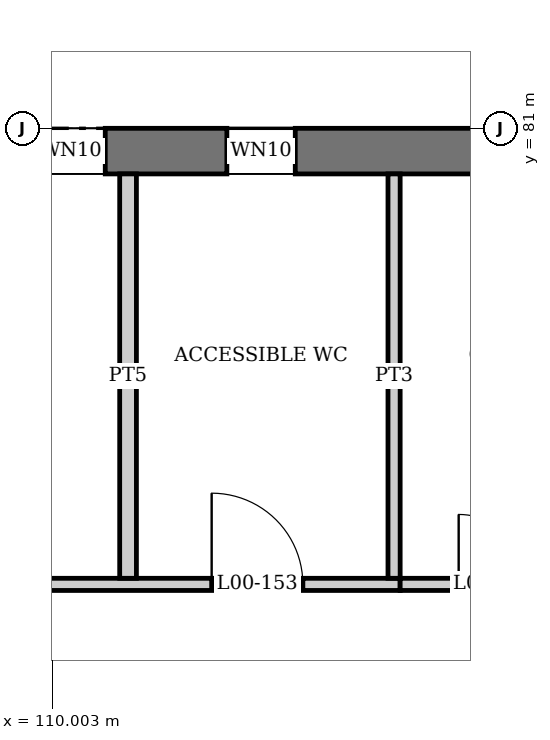
"""IFC4 building model, lengths in metres.
Left out: names, types, materials, properties, quantities, classifications, styles, units other than length and angle.
Written with IfcOpenShell. Run it as: python <this file> out.ifc"""

import sys

from ifc_helpers import new_model, si_unit, direction, frame, frame_2d, origin, place, context, subcontext, project, spatial, rectangle, extrude, element, fill, save


model = new_model("IFC4")
c1 = context("Model", 3, precision=1e-05, world=origin(), true_north=direction((0.0, 1.0)))
c2 = subcontext(c1, "Body", "Model", "MODEL_VIEW")
j1 = project(units=[si_unit("LENGTHUNIT", "METRE"), si_unit("PLANEANGLEUNIT", "RADIAN")], contexts=[c1])
p1 = place(None, origin())
s1 = spatial("IfcSite", under=j1, at=p1, CompositionType="ELEMENT")
p2 = place(p1, origin())
s2 = spatial("IfcBuilding", under=s1, at=p2, CompositionType="ELEMENT")
p3 = place(p2, origin())
s3 = spatial("IfcBuildingStorey", under=s2, at=p3, CompositionType="ELEMENT", Elevation=0.0)
p4 = place(p3, frame((0.0, 80.7, 0.0), z_axis=(0.0, 0.0, 1.0), x_axis=(1.0, 0.0, 0.0)))
e1 = element("IfcWall", 1, at=p4, inside=s3, PredefinedType="SHEAR", context=c2, shape_type="SweptSolid", body=[
    extrude(rectangle(XDim=180.0, YDim=0.6, at=frame_2d((90.0, 0.0))), origin(), (0.0, 0.0, 1.0), 6.0),
])
p5 = place(p4, frame((28.25, 0.0, 0.0)))
e2 = element("IfcOpeningElement", 2, at=p5, cuts=e1, PredefinedType="OPENING", context=c2, shape_type="SweptSolid", body=[
    extrude(rectangle(XDim=1.8, YDim=2.4, at=frame_2d((0.9, 1.2))), frame((0.0, 0.31, 0.0), z_axis=(0.0, -1.0, 0.0), x_axis=(1.0, 0.0, 0.0)), (0.0, 0.0, 1.0), 0.62),
])
p6 = place(p4, frame((82.25, 0.0, 0.0)))
e3 = element("IfcOpeningElement", 3, at=p6, cuts=e1, PredefinedType="OPENING", context=c2, shape_type="SweptSolid", body=[
    extrude(rectangle(XDim=1.8, YDim=2.4, at=frame_2d((0.9, 1.2))), frame((0.0, 0.31, 0.0), z_axis=(0.0, -1.0, 0.0), x_axis=(1.0, 0.0, 0.0)), (0.0, 0.0, 1.0), 0.62),
])
p7 = place(p4, frame((90.75, 0.0, 0.0)))
e4 = element("IfcOpeningElement", 4, at=p7, cuts=e1, PredefinedType="OPENING", context=c2, shape_type="SweptSolid", body=[
    extrude(rectangle(XDim=3.0, YDim=3.0, at=frame_2d((1.5, 1.5))), frame((0.0, 0.31, 0.0), z_axis=(0.0, -1.0, 0.0), x_axis=(1.0, 0.0, 0.0)), (0.0, 0.0, 1.0), 0.62),
])
p8 = place(p4, frame((95.25, 0.0, 0.0)))
e5 = element("IfcOpeningElement", 5, at=p8, cuts=e1, PredefinedType="OPENING", context=c2, shape_type="SweptSolid", body=[
    extrude(rectangle(XDim=3.0, YDim=3.0, at=frame_2d((1.5, 1.5))), frame((0.0, 0.31, 0.0), z_axis=(0.0, -1.0, 0.0), x_axis=(1.0, 0.0, 0.0)), (0.0, 0.0, 1.0), 0.62),
])
p9 = place(p4, frame((1.35, 0.0, 0.9)))
e6 = element("IfcOpeningElement", 6, at=p9, cuts=e1, PredefinedType="OPENING", context=c2, shape_type="SweptSolid", body=[
    extrude(rectangle(XDim=1.8, YDim=1.5, at=frame_2d((0.9, 0.75))), frame((0.0, 0.31, 0.0), z_axis=(0.0, -1.0, 0.0), x_axis=(1.0, 0.0, 0.0)), (0.0, 0.0, 1.0), 0.62),
])
p10 = place(p4, frame((5.85, 0.0, 0.9)))
e7 = element("IfcOpeningElement", 7, at=p10, cuts=e1, PredefinedType="OPENING", context=c2, shape_type="SweptSolid", body=[
    extrude(rectangle(XDim=1.8, YDim=1.5, at=frame_2d((0.9, 0.75))), frame((0.0, 0.31, 0.0), z_axis=(0.0, -1.0, 0.0), x_axis=(1.0, 0.0, 0.0)), (0.0, 0.0, 1.0), 0.62),
])
p11 = place(p4, frame((10.35, 0.0, 0.9)))
e8 = element("IfcOpeningElement", 8, at=p11, cuts=e1, PredefinedType="OPENING", context=c2, shape_type="SweptSolid", body=[
    extrude(rectangle(XDim=1.8, YDim=1.5, at=frame_2d((0.9, 0.75))), frame((0.0, 0.31, 0.0), z_axis=(0.0, -1.0, 0.0), x_axis=(1.0, 0.0, 0.0)), (0.0, 0.0, 1.0), 0.62),
])
p12 = place(p4, frame((14.85, 0.0, 0.9)))
e9 = element("IfcOpeningElement", 9, at=p12, cuts=e1, PredefinedType="OPENING", context=c2, shape_type="SweptSolid", body=[
    extrude(rectangle(XDim=1.8, YDim=1.5, at=frame_2d((0.9, 0.75))), frame((0.0, 0.31, 0.0), z_axis=(0.0, -1.0, 0.0), x_axis=(1.0, 0.0, 0.0)), (0.0, 0.0, 1.0), 0.62),
])
p13 = place(p4, frame((19.65, 0.0, 1.2)))
e10 = element("IfcOpeningElement", 10, at=p13, cuts=e1, PredefinedType="OPENING", context=c2, shape_type="SweptSolid", body=[
    extrude(rectangle(XDim=1.2, YDim=1.2, at=frame_2d((0.6, 0.6))), frame((0.0, 0.31, 0.0), z_axis=(0.0, -1.0, 0.0), x_axis=(1.0, 0.0, 0.0)), (0.0, 0.0, 1.0), 0.62),
])
p14 = place(p4, frame((24.15, 0.0, 1.2)))
e11 = element("IfcOpeningElement", 11, at=p14, cuts=e1, PredefinedType="OPENING", context=c2, shape_type="SweptSolid", body=[
    extrude(rectangle(XDim=1.2, YDim=1.2, at=frame_2d((0.6, 0.6))), frame((0.0, 0.31, 0.0), z_axis=(0.0, -1.0, 0.0), x_axis=(1.0, 0.0, 0.0)), (0.0, 0.0, 1.0), 0.62),
])
p15 = place(p4, frame((37.35, 0.0, 0.9)))
e12 = element("IfcOpeningElement", 12, at=p15, cuts=e1, PredefinedType="OPENING", context=c2, shape_type="SweptSolid", body=[
    extrude(rectangle(XDim=1.8, YDim=1.5, at=frame_2d((0.9, 0.75))), frame((0.0, 0.31, 0.0), z_axis=(0.0, -1.0, 0.0), x_axis=(1.0, 0.0, 0.0)), (0.0, 0.0, 1.0), 0.62),
])
p16 = place(p4, frame((41.85, 0.0, 0.9)))
e13 = element("IfcOpeningElement", 13, at=p16, cuts=e1, PredefinedType="OPENING", context=c2, shape_type="SweptSolid", body=[
    extrude(rectangle(XDim=1.8, YDim=1.5, at=frame_2d((0.9, 0.75))), frame((0.0, 0.31, 0.0), z_axis=(0.0, -1.0, 0.0), x_axis=(1.0, 0.0, 0.0)), (0.0, 0.0, 1.0), 0.62),
])
p17 = place(p4, frame((46.35, 0.0, 0.9)))
e14 = element("IfcOpeningElement", 14, at=p17, cuts=e1, PredefinedType="OPENING", context=c2, shape_type="SweptSolid", body=[
    extrude(rectangle(XDim=1.8, YDim=1.5, at=frame_2d((0.9, 0.75))), frame((0.0, 0.31, 0.0), z_axis=(0.0, -1.0, 0.0), x_axis=(1.0, 0.0, 0.0)), (0.0, 0.0, 1.0), 0.62),
])
p18 = place(p4, frame((50.85, 0.0, 0.9)))
e15 = element("IfcOpeningElement", 15, at=p18, cuts=e1, PredefinedType="OPENING", context=c2, shape_type="SweptSolid", body=[
    extrude(rectangle(XDim=1.8, YDim=1.5, at=frame_2d((0.9, 0.75))), frame((0.0, 0.31, 0.0), z_axis=(0.0, -1.0, 0.0), x_axis=(1.0, 0.0, 0.0)), (0.0, 0.0, 1.0), 0.62),
])
p19 = place(p4, frame((55.35, 0.0, 0.9)))
e16 = element("IfcOpeningElement", 16, at=p19, cuts=e1, PredefinedType="OPENING", context=c2, shape_type="SweptSolid", body=[
    extrude(rectangle(XDim=1.8, YDim=1.5, at=frame_2d((0.9, 0.75))), frame((0.0, 0.31, 0.0), z_axis=(0.0, -1.0, 0.0), x_axis=(1.0, 0.0, 0.0)), (0.0, 0.0, 1.0), 0.62),
])
p20 = place(p4, frame((59.85, 0.0, 0.9)))
e17 = element("IfcOpeningElement", 17, at=p20, cuts=e1, PredefinedType="OPENING", context=c2, shape_type="SweptSolid", body=[
    extrude(rectangle(XDim=1.8, YDim=1.5, at=frame_2d((0.9, 0.75))), frame((0.0, 0.31, 0.0), z_axis=(0.0, -1.0, 0.0), x_axis=(1.0, 0.0, 0.0)), (0.0, 0.0, 1.0), 0.62),
])
p21 = place(p4, frame((64.35, 0.0, 0.9)))
e18 = element("IfcOpeningElement", 18, at=p21, cuts=e1, PredefinedType="OPENING", context=c2, shape_type="SweptSolid", body=[
    extrude(rectangle(XDim=1.8, YDim=1.5, at=frame_2d((0.9, 0.75))), frame((0.0, 0.31, 0.0), z_axis=(0.0, -1.0, 0.0), x_axis=(1.0, 0.0, 0.0)), (0.0, 0.0, 1.0), 0.62),
])
p22 = place(p4, frame((68.85, 0.0, 0.9)))
e19 = element("IfcOpeningElement", 19, at=p22, cuts=e1, PredefinedType="OPENING", context=c2, shape_type="SweptSolid", body=[
    extrude(rectangle(XDim=1.8, YDim=1.5, at=frame_2d((0.9, 0.75))), frame((0.0, 0.31, 0.0), z_axis=(0.0, -1.0, 0.0), x_axis=(1.0, 0.0, 0.0)), (0.0, 0.0, 1.0), 0.62),
])
p23 = place(p4, frame((73.35, 0.0, 0.9)))
e20 = element("IfcOpeningElement", 20, at=p23, cuts=e1, PredefinedType="OPENING", context=c2, shape_type="SweptSolid", body=[
    extrude(rectangle(XDim=1.8, YDim=1.5, at=frame_2d((0.9, 0.75))), frame((0.0, 0.31, 0.0), z_axis=(0.0, -1.0, 0.0), x_axis=(1.0, 0.0, 0.0)), (0.0, 0.0, 1.0), 0.62),
])
p24 = place(p4, frame((77.85, 0.0, 0.9)))
e21 = element("IfcOpeningElement", 21, at=p24, cuts=e1, PredefinedType="OPENING", context=c2, shape_type="SweptSolid", body=[
    extrude(rectangle(XDim=1.8, YDim=1.5, at=frame_2d((0.9, 0.75))), frame((0.0, 0.31, 0.0), z_axis=(0.0, -1.0, 0.0), x_axis=(1.0, 0.0, 0.0)), (0.0, 0.0, 1.0), 0.62),
])
p25 = place(p4, frame((100.8, 0.0, 1.7)))
e22 = element("IfcOpeningElement", 22, at=p25, cuts=e1, PredefinedType="OPENING", context=c2, shape_type="SweptSolid", body=[
    extrude(rectangle(XDim=0.9, YDim=0.6, at=frame_2d((0.45, 0.3))), frame((0.0, 0.31, 0.0), z_axis=(0.0, -1.0, 0.0), x_axis=(1.0, 0.0, 0.0)), (0.0, 0.0, 1.0), 0.62),
])
p26 = place(p4, frame((105.3, 0.0, 1.7)))
e23 = element("IfcOpeningElement", 23, at=p26, cuts=e1, PredefinedType="OPENING", context=c2, shape_type="SweptSolid", body=[
    extrude(rectangle(XDim=0.9, YDim=0.6, at=frame_2d((0.45, 0.3))), frame((0.0, 0.31, 0.0), z_axis=(0.0, -1.0, 0.0), x_axis=(1.0, 0.0, 0.0)), (0.0, 0.0, 1.0), 0.62),
])
p27 = place(p4, frame((109.8, 0.0, 1.7)))
e24 = element("IfcOpeningElement", 24, at=p27, cuts=e1, PredefinedType="OPENING", context=c2, shape_type="SweptSolid", body=[
    extrude(rectangle(XDim=0.9, YDim=0.6, at=frame_2d((0.45, 0.3))), frame((0.0, 0.31, 0.0), z_axis=(0.0, -1.0, 0.0), x_axis=(1.0, 0.0, 0.0)), (0.0, 0.0, 1.0), 0.62),
])
p28 = place(p4, frame((154.65, 0.0, 1.2)))
e25 = element("IfcOpeningElement", 25, at=p28, cuts=e1, PredefinedType="OPENING", context=c2, shape_type="SweptSolid", body=[
    extrude(rectangle(XDim=1.2, YDim=1.2, at=frame_2d((0.6, 0.6))), frame((0.0, 0.31, 0.0), z_axis=(0.0, -1.0, 0.0), x_axis=(1.0, 0.0, 0.0)), (0.0, 0.0, 1.0), 0.62),
])
p29 = place(p4, frame((159.15, 0.0, 1.2)))
e26 = element("IfcOpeningElement", 26, at=p29, cuts=e1, PredefinedType="OPENING", context=c2, shape_type="SweptSolid", body=[
    extrude(rectangle(XDim=1.2, YDim=1.2, at=frame_2d((0.6, 0.6))), frame((0.0, 0.31, 0.0), z_axis=(0.0, -1.0, 0.0), x_axis=(1.0, 0.0, 0.0)), (0.0, 0.0, 1.0), 0.62),
])
p30 = place(p4, frame((163.8, 0.0, 1.7)))
e27 = element("IfcOpeningElement", 27, at=p30, cuts=e1, PredefinedType="OPENING", context=c2, shape_type="SweptSolid", body=[
    extrude(rectangle(XDim=0.9, YDim=0.6, at=frame_2d((0.45, 0.3))), frame((0.0, 0.31, 0.0), z_axis=(0.0, -1.0, 0.0), x_axis=(1.0, 0.0, 0.0)), (0.0, 0.0, 1.0), 0.62),
])
p31 = place(p4, frame((168.3, 0.0, 1.7)))
e28 = element("IfcOpeningElement", 28, at=p31, cuts=e1, PredefinedType="OPENING", context=c2, shape_type="SweptSolid", body=[
    extrude(rectangle(XDim=0.9, YDim=0.6, at=frame_2d((0.45, 0.3))), frame((0.0, 0.31, 0.0), z_axis=(0.0, -1.0, 0.0), x_axis=(1.0, 0.0, 0.0)), (0.0, 0.0, 1.0), 0.62),
])
p32 = place(p4, frame((107.55, 0.0, 1.7)))
e29 = element("IfcOpeningElement", 29, at=p32, cuts=e1, PredefinedType="OPENING", context=c2, shape_type="SweptSolid", body=[
    extrude(rectangle(XDim=0.9, YDim=0.6, at=frame_2d((0.45, 0.3))), frame((0.0, 0.31, 0.0), z_axis=(0.0, -1.0, 0.0), x_axis=(1.0, 0.0, 0.0)), (0.0, 0.0, 1.0), 0.62),
])
p33 = place(p4, frame((112.3, 0.0, 1.7)))
e30 = element("IfcOpeningElement", 30, at=p33, cuts=e1, PredefinedType="OPENING", context=c2, shape_type="SweptSolid", body=[
    extrude(rectangle(XDim=0.9, YDim=0.6, at=frame_2d((0.45, 0.3))), frame((0.0, 0.31, 0.0), z_axis=(0.0, -1.0, 0.0), x_axis=(1.0, 0.0, 0.0)), (0.0, 0.0, 1.0), 0.62),
])
p34 = place(p4, frame((166.05, 0.0, 1.7)))
e31 = element("IfcOpeningElement", 31, at=p34, cuts=e1, PredefinedType="OPENING", context=c2, shape_type="SweptSolid", body=[
    extrude(rectangle(XDim=0.9, YDim=0.6, at=frame_2d((0.45, 0.3))), frame((0.0, 0.31, 0.0), z_axis=(0.0, -1.0, 0.0), x_axis=(1.0, 0.0, 0.0)), (0.0, 0.0, 1.0), 0.62),
])
p35 = place(p3, frame((98.92, 75.0, 0.0), z_axis=(0.0, 0.0, 1.0), x_axis=(1.0, 0.0, 0.0)))
e32 = element("IfcWall", 32, at=p35, inside=s3, PredefinedType="PARTITIONING", context=c2, shape_type="SweptSolid", body=[
    extrude(rectangle(XDim=15.66, YDim=0.16, at=frame_2d((7.83, 0.0))), origin(), (0.0, 0.0, 1.0), 5.447),
])
p36 = place(p35, frame((2.68, 0.0, 0.0)))
e33 = element("IfcOpeningElement", 33, at=p36, cuts=e32, PredefinedType="OPENING", context=c2, shape_type="SweptSolid", body=[
    extrude(rectangle(XDim=1.0, YDim=2.1, at=frame_2d((0.5, 1.05))), frame((0.0, 0.09, 0.0), z_axis=(0.0, -1.0, 0.0), x_axis=(1.0, 0.0, 0.0)), (0.0, 0.0, 1.0), 0.18),
])
p37 = place(p35, frame((8.68, 0.0, 0.0)))
e34 = element("IfcOpeningElement", 34, at=p37, cuts=e32, PredefinedType="OPENING", context=c2, shape_type="SweptSolid", body=[
    extrude(rectangle(XDim=1.0, YDim=2.1, at=frame_2d((0.5, 1.05))), frame((0.0, 0.09, 0.0), z_axis=(0.0, -1.0, 0.0), x_axis=(1.0, 0.0, 0.0)), (0.0, 0.0, 1.0), 0.18),
])
p38 = place(p35, frame((13.18, 0.0, 0.0)))
e35 = element("IfcOpeningElement", 35, at=p38, cuts=e32, PredefinedType="OPENING", context=c2, shape_type="SweptSolid", body=[
    extrude(rectangle(XDim=1.2, YDim=2.1, at=frame_2d((0.6, 1.05))), frame((0.0, 0.09, 0.0), z_axis=(0.0, -1.0, 0.0), x_axis=(1.0, 0.0, 0.0)), (0.0, 0.0, 1.0), 0.18),
])
p39 = place(p3, frame((114.58, 75.0, 0.0), z_axis=(0.0, 0.0, 1.0), x_axis=(1.0, 0.0, 0.0)))
e36 = element("IfcWall", 36, at=p39, inside=s3, PredefinedType="PARTITIONING", context=c2, shape_type="SweptSolid", body=[
    extrude(rectangle(XDim=2.42, YDim=0.16, at=frame_2d((1.21, 0.0))), origin(), (0.0, 0.0, 1.0), 5.85),
])
p40 = place(p39, frame((0.77, 0.0, 0.0)))
e37 = element("IfcOpeningElement", 37, at=p40, cuts=e36, PredefinedType="OPENING", context=c2, shape_type="SweptSolid", body=[
    extrude(rectangle(XDim=0.92, YDim=2.1, at=frame_2d((0.46, 1.05))), frame((0.0, 0.09, 0.0), z_axis=(0.0, -1.0, 0.0), x_axis=(1.0, 0.0, 0.0)), (0.0, 0.0, 1.0), 0.18),
])
p41 = place(p3, frame((111.0, 75.08, 0.0), z_axis=(0.0, 0.0, 1.0), x_axis=(0.0, 1.0, 0.0)))
e38 = element("IfcWall", 38, at=p41, inside=s3, PredefinedType="PLUMBINGWALL", context=c2, shape_type="SweptSolid", body=[
    extrude(rectangle(XDim=5.32, YDim=0.22, at=frame_2d((2.66, 0.0))), origin(), (0.0, 0.0, 1.0), 5.85),
])
p42 = place(p3, frame((114.5, 75.08, 0.0), z_axis=(0.0, 0.0, 1.0), x_axis=(0.0, 1.0, 0.0)))
e39 = element("IfcWall", 39, at=p42, inside=s3, PredefinedType="PARTITIONING", context=c2, shape_type="SweptSolid", body=[
    extrude(rectangle(XDim=5.32, YDim=0.16, at=frame_2d((2.66, 0.0))), origin(), (0.0, 0.0, 1.0), 5.85),
])
p43 = place(p27, origin())
e40 = element("IfcWindow", 40, at=p43, inside=s3, PartitioningType="SINGLE_PANEL", PredefinedType="WINDOW", context=c2, shape_type="SweptSolid", body=[
    extrude(rectangle(XDim=0.9, YDim=0.6, at=frame_2d((0.45, 0.3))), frame((0.0, 0.03, 0.0), z_axis=(0.0, -1.0, 0.0), x_axis=(1.0, 0.0, 0.0)), (0.0, 0.0, 1.0), 0.06),
])
fill(e24, e40)
p44 = place(p33, origin())
e41 = element("IfcWindow", 41, at=p44, inside=s3, PartitioningType="SINGLE_PANEL", PredefinedType="WINDOW", context=c2, shape_type="SweptSolid", body=[
    extrude(rectangle(XDim=0.9, YDim=0.6, at=frame_2d((0.45, 0.3))), frame((0.0, 0.03, 0.0), z_axis=(0.0, -1.0, 0.0), x_axis=(1.0, 0.0, 0.0)), (0.0, 0.0, 1.0), 0.06),
])
fill(e30, e41)
p45 = place(p38, origin())
e42 = element("IfcDoor", 42, at=p45, inside=s3, OperationType="SINGLE_SWING_LEFT", PredefinedType="DOOR", context=c2, shape_type="SweptSolid", body=[
    extrude(rectangle(XDim=1.2, YDim=2.1, at=frame_2d((0.6, 1.05))), frame((0.0, 0.025, 0.0), z_axis=(0.0, -1.0, 0.0), x_axis=(1.0, 0.0, 0.0)), (0.0, 0.0, 1.0), 0.05),
])
fill(e35, e42)
p46 = place(p40, origin())
e43 = element("IfcDoor", 43, at=p46, inside=s3, OperationType="SINGLE_SWING_LEFT", PredefinedType="DOOR", context=c2, shape_type="SweptSolid", body=[
    extrude(rectangle(XDim=0.92, YDim=2.1, at=frame_2d((0.46, 1.05))), frame((0.0, 0.025, 0.0), z_axis=(0.0, -1.0, 0.0), x_axis=(1.0, 0.0, 0.0)), (0.0, 0.0, 1.0), 0.05),
])
fill(e37, e43)
save(model, sys.argv[1])
